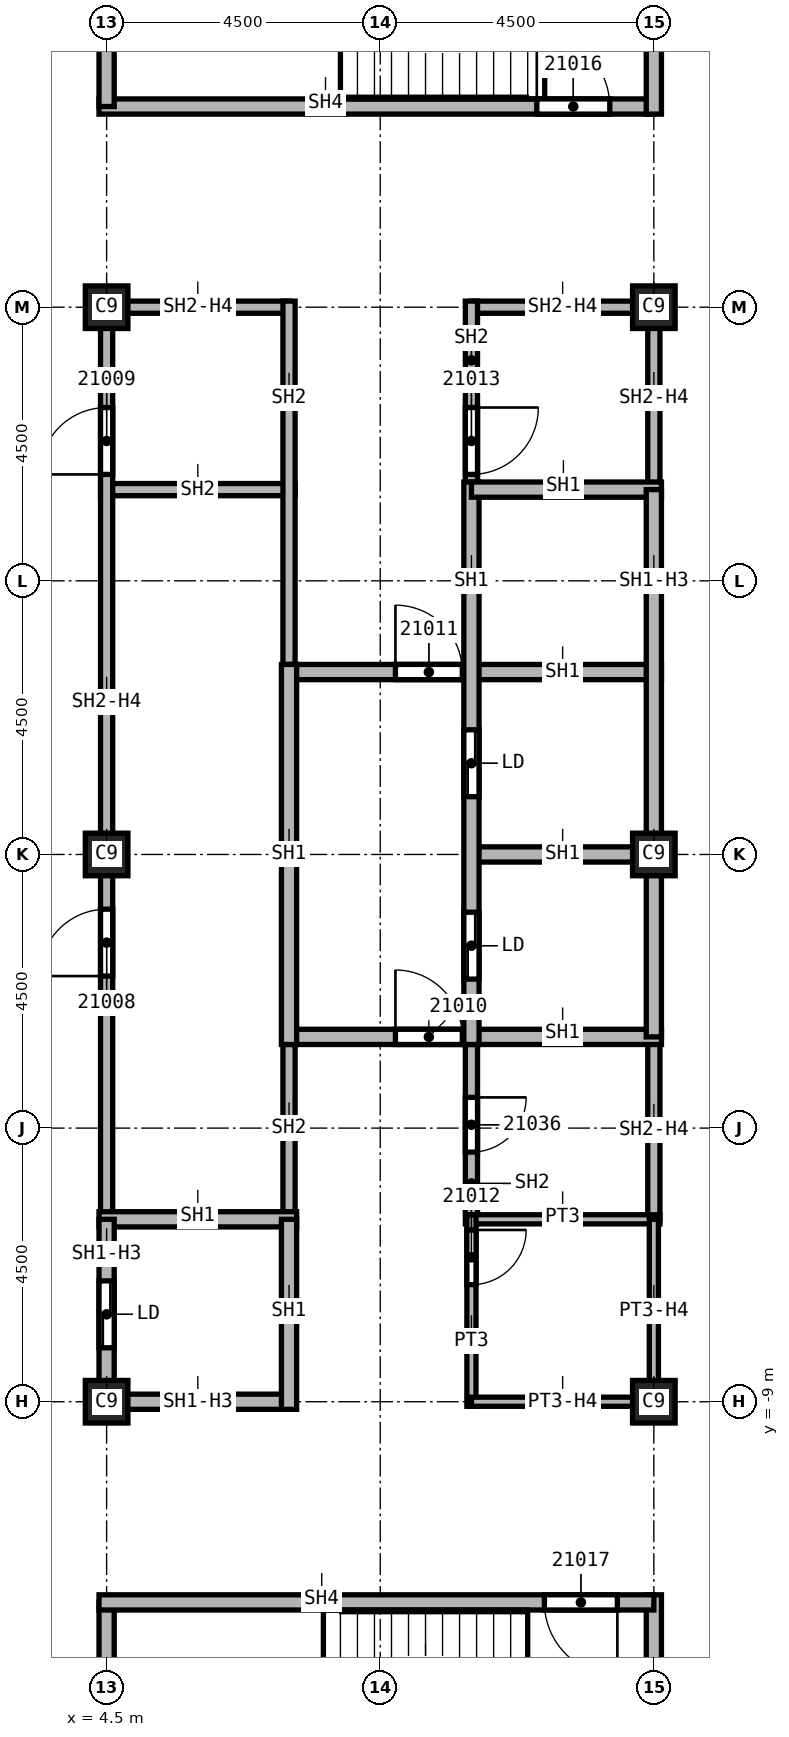
"""IFC4 building model, lengths in metres.
Left out: names, types, materials, properties, quantities, classifications, styles, units other than length and angle.
Written with IfcOpenShell. Run it as: python <this file> out.ifc"""

import sys

from ifc_helpers import new_model, si_unit, direction, frame, frame_2d, origin, origin_2d, place, context, subcontext, project, spatial, rectangle, extrude, element, fill, save


model = new_model("IFC4")
c1 = context("Model", 3, precision=1e-05, world=origin(), true_north=direction((0.0, 1.0)))
c2 = subcontext(c1, "Body", "Model", "MODEL_VIEW")
j1 = project(units=[si_unit("LENGTHUNIT", "METRE"), si_unit("PLANEANGLEUNIT", "RADIAN")], contexts=[c1])
p1 = place(None, origin())
s1 = spatial("IfcSite", under=j1, at=p1, CompositionType="ELEMENT")
p2 = place(p1, origin())
s2 = spatial("IfcBuilding", under=s1, at=p2, CompositionType="ELEMENT")
p3 = place(p2, frame((0.0, 0.0, 300.0)))
s3 = spatial("IfcBuildingStorey", under=s2, at=p3, CompositionType="ELEMENT", Elevation=300.0)
for number, where, z_axis, x_axis in (
    (1, (4.5, 0.0, 0.0), (0.0, 0.0, 1.0), (1.0, 0.0, 0.0)),
    (2, (4.5, 9.0, 0.0), (0.0, 0.0, 1.0), (1.0, 0.0, 0.0)),
    (3, (4.5, -9.0, 0.0), (0.0, 0.0, 1.0), (1.0, 0.0, 0.0)),
    (4, (13.5, 0.0, 0.0), (0.0, 0.0, 1.0), (1.0, 0.0, 0.0)),
    (5, (13.5, 9.0, 0.0), (0.0, 0.0, 1.0), (1.0, 0.0, 0.0)),
    (6, (13.5, -9.0, 0.0), (0.0, 0.0, 1.0), (1.0, 0.0, 0.0)),
):
    element("IfcColumn", number, at=place(p3, frame(where, z_axis=z_axis, x_axis=x_axis)), inside=s3, PredefinedType="COLUMN", context=c2, shape_type="SweptSolid", body=[
        extrude(rectangle(XDim=0.7, YDim=0.7, at=origin_2d()), origin(), (0.0, 0.0, 1.0), 3.74),
    ])
p4 = place(p3, frame((4.4, 6.0, 0.0), z_axis=(0.0, 0.0, 1.0), x_axis=(1.0, 0.0, 0.0)))
e7 = element("IfcWall", 7, at=p4, inside=s3, PredefinedType="SOLIDWALL", context=c2, shape_type="SweptSolid", body=[
    extrude(rectangle(XDim=3.2, YDim=0.2, at=frame_2d((1.6, 0.0))), origin(), (0.0, 0.0, 1.0), 3.74),
])
p5 = place(p3, frame((4.5, -6.0, 0.0), z_axis=(0.0, 0.0, 1.0), x_axis=(0.0, 1.0, 0.0)))
e8 = element("IfcWall", 8, at=p5, inside=s3, PredefinedType="SOLIDWALL", context=c2, shape_type="SweptSolid", body=[
    extrude(rectangle(XDim=15.1, YDim=0.2, at=frame_2d((7.55, 0.0))), origin(), (0.0, 0.0, 1.0), 3.062),
])
p6 = place(p5, frame((4.0, 0.0, 0.0)))
e9 = element("IfcOpeningElement", 9, at=p6, cuts=e8, PredefinedType="OPENING", context=c2, shape_type="SweptSolid", body=[
    extrude(rectangle(XDim=1.1, YDim=2.1, at=frame_2d((0.55, 1.05))), frame((0.0, 0.1, 0.0), z_axis=(0.0, -1.0, 0.0), x_axis=(1.0, 0.0, 0.0)), (0.0, 0.0, 1.0), 0.2),
])
p7 = place(p5, frame((12.25, 0.0, 0.0)))
e10 = element("IfcOpeningElement", 10, at=p7, cuts=e8, PredefinedType="OPENING", context=c2, shape_type="SweptSolid", body=[
    extrude(rectangle(XDim=1.1, YDim=2.1, at=frame_2d((0.55, 1.05))), frame((0.0, 0.1, 0.0), z_axis=(0.0, -1.0, 0.0), x_axis=(1.0, 0.0, 0.0)), (0.0, 0.0, 1.0), 0.2),
])
p8 = place(p3, frame((4.5, 9.0, 0.0), z_axis=(0.0, 0.0, 1.0), x_axis=(1.0, 0.0, 0.0)))
e11 = element("IfcWall", 11, at=p8, inside=s3, PredefinedType="SOLIDWALL", context=c2, shape_type="SweptSolid", body=[
    extrude(rectangle(XDim=3.0, YDim=0.2, at=frame_2d((1.5, 0.0))), origin(), (0.0, 0.0, 1.0), 3.062),
])
p9 = place(p3, frame((7.5, -2.875, 0.0), z_axis=(0.0, 0.0, 1.0), x_axis=(0.0, -1.0, 0.0)))
e12 = element("IfcWall", 12, at=p9, inside=s3, PredefinedType="SOLIDWALL", context=c2, shape_type="SweptSolid", body=[
    extrude(rectangle(XDim=3.125, YDim=0.2, at=frame_2d((1.562, 0.0))), origin(), (0.0, 0.0, 1.0), 3.74),
])
p10 = place(p3, frame((7.5, 9.1, 0.0), z_axis=(0.0, 0.0, 1.0), x_axis=(0.0, -1.0, 0.0)))
e13 = element("IfcWall", 13, at=p10, inside=s3, PredefinedType="SOLIDWALL", context=c2, shape_type="SweptSolid", body=[
    extrude(rectangle(XDim=6.225, YDim=0.2, at=frame_2d((3.113, 0.0))), origin(), (0.0, 0.0, 1.0), 3.74),
])
p11 = place(p3, frame((10.5, -2.875, 0.0), z_axis=(0.0, 0.0, 1.0), x_axis=(0.0, -1.0, 0.0)))
e14 = element("IfcWall", 14, at=p11, inside=s3, PredefinedType="SOLIDWALL", context=c2, shape_type="SweptSolid", body=[
    extrude(rectangle(XDim=3.2, YDim=0.2, at=frame_2d((1.6, 0.0))), origin(), (0.0, 0.0, 1.0), 3.74),
])
p12 = place(p11, frame((1.12, 0.0, 0.0)))
e15 = element("IfcOpeningElement", 15, at=p12, cuts=e14, PredefinedType="OPENING", context=c2, shape_type="SweptSolid", body=[
    extrude(rectangle(XDim=0.9, YDim=2.1, at=frame_2d((0.45, 1.05))), frame((0.0, 0.1, 0.0), z_axis=(0.0, -1.0, 0.0), x_axis=(1.0, 0.0, 0.0)), (0.0, 0.0, 1.0), 0.2),
])
p13 = place(p3, frame((10.5, 9.0, 0.0), z_axis=(0.0, 0.0, 1.0), x_axis=(1.0, 0.0, 0.0)))
e16 = element("IfcWall", 16, at=p13, inside=s3, PredefinedType="SOLIDWALL", context=c2, shape_type="SweptSolid", body=[
    extrude(rectangle(XDim=3.0, YDim=0.2, at=frame_2d((1.5, 0.0))), origin(), (0.0, 0.0, 1.0), 3.062),
])
p14 = place(p3, frame((10.5, 9.1, 0.0), z_axis=(0.0, 0.0, 1.0), x_axis=(0.0, -1.0, 0.0)))
e17 = element("IfcWall", 17, at=p14, inside=s3, PredefinedType="SOLIDWALL", context=c2, shape_type="SweptSolid", body=[
    extrude(rectangle(XDim=3.225, YDim=0.2, at=frame_2d((1.613, 0.0))), origin(), (0.0, 0.0, 1.0), 3.74),
])
p15 = place(p14, frame((1.75, 0.0, 0.0)))
e18 = element("IfcOpeningElement", 18, at=p15, cuts=e17, PredefinedType="OPENING", context=c2, shape_type="SweptSolid", body=[
    extrude(rectangle(XDim=1.1, YDim=2.1, at=frame_2d((0.55, 1.05))), frame((0.0, 0.1, 0.0), z_axis=(0.0, -1.0, 0.0), x_axis=(1.0, 0.0, 0.0)), (0.0, 0.0, 1.0), 0.2),
])
p16 = place(p3, frame((13.5, -3.0, 0.0), z_axis=(0.0, 0.0, 1.0), x_axis=(0.0, -1.0, 0.0)))
e19 = element("IfcWall", 19, at=p16, inside=s3, PredefinedType="SOLIDWALL", context=c2, shape_type="SweptSolid", body=[
    extrude(rectangle(XDim=3.0, YDim=0.2, at=frame_2d((1.5, 0.0))), origin(), (0.0, 0.0, 1.0), 3.062),
])
p17 = place(p3, frame((13.5, 9.1, 0.0), z_axis=(0.0, 0.0, 1.0), x_axis=(0.0, -1.0, 0.0)))
e20 = element("IfcWall", 20, at=p17, inside=s3, PredefinedType="SOLIDWALL", context=c2, shape_type="SweptSolid", body=[
    extrude(rectangle(XDim=3.1, YDim=0.2, at=frame_2d((1.55, 0.0))), origin(), (0.0, 0.0, 1.0), 3.062),
])
p18 = place(p3, frame((4.375, -6.0, 0.0), z_axis=(0.0, 0.0, 1.0), x_axis=(1.0, 0.0, 0.0)))
e21 = element("IfcWall", 21, at=p18, inside=s3, PredefinedType="SOLIDWALL", context=c2, shape_type="SweptSolid", body=[
    extrude(rectangle(XDim=3.25, YDim=0.25, at=frame_2d((1.625, 0.0))), origin(), (0.0, 0.0, 1.0), 3.74),
])
p19 = place(p3, frame((4.5, -9.125, 0.0), z_axis=(0.0, 0.0, 1.0), x_axis=(0.0, 1.0, 0.0)))
e22 = element("IfcWall", 22, at=p19, inside=s3, PredefinedType="SOLIDWALL", context=c2, shape_type="SweptSolid", body=[
    extrude(rectangle(XDim=3.125, YDim=0.25, at=frame_2d((1.562, 0.0))), origin(), (0.0, 0.0, 1.0), 3.062),
])
p20 = place(p19, frame((1.012, 0.0, 0.0)))
e23 = element("IfcOpeningElement", 23, at=p20, cuts=e22, PredefinedType="OPENING", context=c2, shape_type="SweptSolid", body=[
    extrude(rectangle(XDim=1.1, YDim=2.1, at=frame_2d((0.55, 1.05))), frame((0.0, 0.125, 0.0), z_axis=(0.0, -1.0, 0.0), x_axis=(1.0, 0.0, 0.0)), (0.0, 0.0, 1.0), 0.25),
])
p21 = place(p3, frame((7.5, -9.0, 0.0), z_axis=(0.0, 0.0, 1.0), x_axis=(-1.0, 0.0, 0.0)))
e24 = element("IfcWall", 24, at=p21, inside=s3, PredefinedType="SOLIDWALL", context=c2, shape_type="SweptSolid", body=[
    extrude(rectangle(XDim=3.0, YDim=0.25, at=frame_2d((1.5, 0.0))), origin(), (0.0, 0.0, 1.0), 3.062),
])
p22 = place(p3, frame((7.5, -6.0, 0.0), z_axis=(0.0, 0.0, 1.0), x_axis=(0.0, -1.0, 0.0)))
e25 = element("IfcWall", 25, at=p22, inside=s3, PredefinedType="SOLIDWALL", context=c2, shape_type="SweptSolid", body=[
    extrude(rectangle(XDim=3.125, YDim=0.25, at=frame_2d((1.562, 0.0))), origin(), (0.0, 0.0, 1.0), 3.74),
])
p23 = place(p3, frame((7.5, -3.0, 0.0), z_axis=(0.0, 0.0, 1.0), x_axis=(1.0, 0.0, 0.0)))
e26 = element("IfcWall", 26, at=p23, inside=s3, PredefinedType="SOLIDWALL", context=c2, shape_type="SweptSolid", body=[
    extrude(rectangle(XDim=6.125, YDim=0.25, at=frame_2d((3.062, 0.0))), origin(), (0.0, 0.0, 1.0), 3.74),
])
p24 = place(p23, frame((1.75, 0.0, 0.0)))
e27 = element("IfcOpeningElement", 27, at=p24, cuts=e26, PredefinedType="OPENING", context=c2, shape_type="SweptSolid", body=[
    extrude(rectangle(XDim=1.1, YDim=2.1, at=frame_2d((0.55, 1.05))), frame((0.0, 0.125, 0.0), z_axis=(0.0, -1.0, 0.0), x_axis=(1.0, 0.0, 0.0)), (0.0, 0.0, 1.0), 0.25),
])
p25 = place(p3, frame((7.5, 3.0, 0.0), z_axis=(0.0, 0.0, 1.0), x_axis=(1.0, 0.0, 0.0)))
e28 = element("IfcWall", 28, at=p25, inside=s3, PredefinedType="SOLIDWALL", context=c2, shape_type="SweptSolid", body=[
    extrude(rectangle(XDim=6.125, YDim=0.25, at=frame_2d((3.062, 0.0))), origin(), (0.0, 0.0, 1.0), 3.74),
])
p26 = place(p25, frame((1.75, 0.0, 0.0)))
e29 = element("IfcOpeningElement", 29, at=p26, cuts=e28, PredefinedType="OPENING", context=c2, shape_type="SweptSolid", body=[
    extrude(rectangle(XDim=1.1, YDim=2.1, at=frame_2d((0.55, 1.05))), frame((0.0, 0.125, 0.0), z_axis=(0.0, -1.0, 0.0), x_axis=(1.0, 0.0, 0.0)), (0.0, 0.0, 1.0), 0.25),
])
p27 = place(p3, frame((7.5, 3.125, 0.0), z_axis=(0.0, 0.0, 1.0), x_axis=(0.0, -1.0, 0.0)))
e30 = element("IfcWall", 30, at=p27, inside=s3, PredefinedType="SOLIDWALL", context=c2, shape_type="SweptSolid", body=[
    extrude(rectangle(XDim=6.25, YDim=0.25, at=frame_2d((3.125, 0.0))), origin(), (0.0, 0.0, 1.0), 3.74),
])
p28 = place(p3, frame((10.5, 0.0, 0.0), z_axis=(0.0, 0.0, 1.0), x_axis=(1.0, 0.0, 0.0)))
e31 = element("IfcWall", 31, at=p28, inside=s3, PredefinedType="SOLIDWALL", context=c2, shape_type="SweptSolid", body=[
    extrude(rectangle(XDim=3.125, YDim=0.25, at=frame_2d((1.562, 0.0))), origin(), (0.0, 0.0, 1.0), 3.74),
])
p29 = place(p3, frame((10.5, 6.125, 0.0), z_axis=(0.0, 0.0, 1.0), x_axis=(0.0, -1.0, 0.0)))
e32 = element("IfcWall", 32, at=p29, inside=s3, PredefinedType="SOLIDWALL", context=c2, shape_type="SweptSolid", body=[
    extrude(rectangle(XDim=9.25, YDim=0.25, at=frame_2d((4.625, 0.0))), origin(), (0.0, 0.0, 1.0), 3.74),
])
p30 = place(p29, frame((7.075, 0.0, 0.0)))
e33 = element("IfcOpeningElement", 33, at=p30, cuts=e32, PredefinedType="OPENING", context=c2, shape_type="SweptSolid", body=[
    extrude(rectangle(XDim=1.1, YDim=2.1, at=frame_2d((0.55, 1.05))), frame((0.0, 0.125, 0.0), z_axis=(0.0, -1.0, 0.0), x_axis=(1.0, 0.0, 0.0)), (0.0, 0.0, 1.0), 0.25),
])
p31 = place(p29, frame((4.075, 0.0, 0.0)))
e34 = element("IfcOpeningElement", 34, at=p31, cuts=e32, PredefinedType="OPENING", context=c2, shape_type="SweptSolid", body=[
    extrude(rectangle(XDim=1.1, YDim=2.1, at=frame_2d((0.55, 1.05))), frame((0.0, 0.125, 0.0), z_axis=(0.0, -1.0, 0.0), x_axis=(1.0, 0.0, 0.0)), (0.0, 0.0, 1.0), 0.25),
])
p32 = place(p3, frame((10.5, 6.0, 0.0), z_axis=(0.0, 0.0, 1.0), x_axis=(1.0, 0.0, 0.0)))
e35 = element("IfcWall", 35, at=p32, inside=s3, PredefinedType="SOLIDWALL", context=c2, shape_type="SweptSolid", body=[
    extrude(rectangle(XDim=3.125, YDim=0.25, at=frame_2d((1.562, 0.0))), origin(), (0.0, 0.0, 1.0), 3.74),
])
p33 = place(p3, frame((13.5, 6.0, 0.0), z_axis=(0.0, 0.0, 1.0), x_axis=(0.0, -1.0, 0.0)))
e36 = element("IfcWall", 36, at=p33, inside=s3, PredefinedType="SOLIDWALL", context=c2, shape_type="SweptSolid", body=[
    extrude(rectangle(XDim=9.0, YDim=0.25, at=frame_2d((4.5, 0.0))), origin(), (0.0, 0.0, 1.0), 3.062),
])
p34 = place(p3, frame((4.375, 12.3, 0.0), z_axis=(0.0, 0.0, 1.0), x_axis=(1.0, 0.0, 0.0)))
e37 = element("IfcWall", 37, at=p34, inside=s3, PredefinedType="SOLIDWALL", context=c2, shape_type="SweptSolid", body=[
    extrude(rectangle(XDim=9.125, YDim=0.25, at=frame_2d((4.562, 0.0))), origin(), (0.0, 0.0, 1.0), 3.74),
])
p35 = place(p34, frame((7.2, 0.0, 0.0)))
e38 = element("IfcOpeningElement", 38, at=p35, cuts=e37, PredefinedType="OPENING", context=c2, shape_type="SweptSolid", body=[
    extrude(rectangle(XDim=1.2, YDim=2.1, at=frame_2d((0.6, 1.05))), frame((0.0, 0.125, 0.0), z_axis=(0.0, -1.0, 0.0), x_axis=(1.0, 0.0, 0.0)), (0.0, 0.0, 1.0), 0.25),
])
for number, where, z_axis, x_axis in (
    (39, (4.5, -16.8, 0.0), (0.0, 0.0, 1.0), (0.0, 1.0, 0.0)),
    (40, (4.5, 12.3, 0.0), (0.0, 0.0, 1.0), (0.0, 1.0, 0.0)),
):
    element("IfcWall", number, at=place(p3, frame(where, z_axis=z_axis, x_axis=x_axis)), inside=s3, PredefinedType="SOLIDWALL", context=c2, shape_type="SweptSolid", body=[
        extrude(rectangle(XDim=4.5, YDim=0.25, at=frame_2d((2.25, 0.0))), origin(), (0.0, 0.0, 1.0), 3.74),
    ])
p36 = place(p3, frame((13.5, -16.925, 0.0), z_axis=(0.0, 0.0, 1.0), x_axis=(0.0, 1.0, 0.0)))
e41 = element("IfcWall", 41, at=p36, inside=s3, PredefinedType="SOLIDWALL", context=c2, shape_type="SweptSolid", body=[
    extrude(rectangle(XDim=4.75, YDim=0.25, at=frame_2d((2.375, 0.0))), origin(), (0.0, 0.0, 1.0), 3.74),
])
p37 = place(p3, frame((13.5, -12.3, 0.0), z_axis=(0.0, 0.0, 1.0), x_axis=(-1.0, 0.0, 0.0)))
e42 = element("IfcWall", 42, at=p37, inside=s3, PredefinedType="SOLIDWALL", context=c2, shape_type="SweptSolid", body=[
    extrude(rectangle(XDim=9.125, YDim=0.25, at=frame_2d((4.562, 0.0))), origin(), (0.0, 0.0, 1.0), 3.74),
])
p38 = place(p37, frame((0.6, 0.0, 0.0)))
e43 = element("IfcOpeningElement", 43, at=p38, cuts=e42, PredefinedType="OPENING", context=c2, shape_type="SweptSolid", body=[
    extrude(rectangle(XDim=1.2, YDim=2.1, at=frame_2d((0.6, 1.05))), frame((0.0, 0.125, 0.0), z_axis=(0.0, -1.0, 0.0), x_axis=(1.0, 0.0, 0.0)), (0.0, 0.0, 1.0), 0.25),
])
p39 = place(p3, frame((13.5, 12.175, 0.0), z_axis=(0.0, 0.0, 1.0), x_axis=(0.0, 1.0, 0.0)))
e44 = element("IfcWall", 44, at=p39, inside=s3, PredefinedType="SOLIDWALL", context=c2, shape_type="SweptSolid", body=[
    extrude(rectangle(XDim=4.75, YDim=0.25, at=frame_2d((2.375, 0.0))), origin(), (0.0, 0.0, 1.0), 3.74),
])
p40 = place(p3, frame((10.5, -6.0, 0.0), z_axis=(0.0, 0.0, 1.0), x_axis=(1.0, 0.0, 0.0)))
e45 = element("IfcWall", 45, at=p40, inside=s3, PredefinedType="PARTITIONING", context=c2, shape_type="SweptSolid", body=[
    extrude(rectangle(XDim=3.1, YDim=0.15, at=frame_2d((1.55, 0.0))), origin(), (0.0, 0.0, 1.0), 3.74),
])
p41 = place(p3, frame((10.5, -5.925, 0.0), z_axis=(0.0, 0.0, 1.0), x_axis=(0.0, -1.0, 0.0)))
e46 = element("IfcWall", 46, at=p41, inside=s3, PredefinedType="PARTITIONING", context=c2, shape_type="SweptSolid", body=[
    extrude(rectangle(XDim=3.15, YDim=0.15, at=frame_2d((1.575, 0.0))), origin(), (0.0, 0.0, 1.0), 3.74),
])
p42 = place(p41, frame((0.25, 0.0, 0.0)))
e47 = element("IfcOpeningElement", 47, at=p42, cuts=e46, PredefinedType="OPENING", context=c2, shape_type="SweptSolid", body=[
    extrude(rectangle(XDim=0.9, YDim=2.1, at=frame_2d((0.45, 1.05))), frame((0.0, 0.075, 0.0), z_axis=(0.0, -1.0, 0.0), x_axis=(1.0, 0.0, 0.0)), (0.0, 0.0, 1.0), 0.15),
])
p43 = place(p3, frame((13.5, -9.0, 0.0), z_axis=(0.0, 0.0, 1.0), x_axis=(-1.0, 0.0, 0.0)))
e48 = element("IfcWall", 48, at=p43, inside=s3, PredefinedType="PARTITIONING", context=c2, shape_type="SweptSolid", body=[
    extrude(rectangle(XDim=3.0, YDim=0.15, at=frame_2d((1.5, 0.0))), origin(), (0.0, 0.0, 1.0), 3.062),
])
p44 = place(p3, frame((13.5, -6.0, 0.0), z_axis=(0.0, 0.0, 1.0), x_axis=(0.0, -1.0, 0.0)))
e49 = element("IfcWall", 49, at=p44, inside=s3, PredefinedType="PARTITIONING", context=c2, shape_type="SweptSolid", body=[
    extrude(rectangle(XDim=3.075, YDim=0.15, at=frame_2d((1.538, 0.0))), origin(), (0.0, 0.0, 1.0), 3.062),
])
p45 = place(p6, origin())
e50 = element("IfcDoor", 50, at=p45, inside=s3, OperationType="SINGLE_SWING_LEFT", PredefinedType="DOOR", context=c2, shape_type="SweptSolid", body=[
    extrude(rectangle(XDim=1.1, YDim=2.1, at=frame_2d((0.55, 1.05))), frame((0.0, 0.025, 0.0), z_axis=(0.0, -1.0, 0.0), x_axis=(1.0, 0.0, 0.0)), (0.0, 0.0, 1.0), 0.05),
])
fill(e9, e50)
p46 = place(p7, origin())
e51 = element("IfcDoor", 51, at=p46, inside=s3, OperationType="SINGLE_SWING_RIGHT", PredefinedType="DOOR", context=c2, shape_type="SweptSolid", body=[
    extrude(rectangle(XDim=1.1, YDim=2.1, at=frame_2d((0.55, 1.05))), frame((0.0, 0.025, 0.0), z_axis=(0.0, -1.0, 0.0), x_axis=(1.0, 0.0, 0.0)), (0.0, 0.0, 1.0), 0.05),
])
fill(e10, e51)
p47 = place(p24, origin())
e52 = element("IfcDoor", 52, at=p47, inside=s3, OperationType="SINGLE_SWING_LEFT", PredefinedType="DOOR", context=c2, shape_type="SweptSolid", body=[
    extrude(rectangle(XDim=1.1, YDim=2.1, at=frame_2d((0.55, 1.05))), frame((0.0, 0.025, 0.0), z_axis=(0.0, -1.0, 0.0), x_axis=(1.0, 0.0, 0.0)), (0.0, 0.0, 1.0), 0.05),
])
fill(e27, e52)
p48 = place(p26, origin())
e53 = element("IfcDoor", 53, at=p48, inside=s3, OperationType="SINGLE_SWING_RIGHT", PredefinedType="DOOR", context=c2, shape_type="SweptSolid", body=[
    extrude(rectangle(XDim=1.1, YDim=2.1, at=frame_2d((0.55, 1.05))), frame((0.0, 0.025, 0.0), z_axis=(0.0, -1.0, 0.0), x_axis=(1.0, 0.0, 0.0)), (0.0, 0.0, 1.0), 0.05),
])
fill(e29, e53)
p49 = place(p42, origin())
e54 = element("IfcDoor", 54, at=p49, inside=s3, OperationType="SINGLE_SWING_LEFT", PredefinedType="DOOR", context=c2, shape_type="SweptSolid", body=[
    extrude(rectangle(XDim=0.9, YDim=2.1, at=frame_2d((0.45, 1.05))), frame((0.0, 0.025, 0.0), z_axis=(0.0, -1.0, 0.0), x_axis=(1.0, 0.0, 0.0)), (0.0, 0.0, 1.0), 0.05),
])
fill(e47, e54)
p50 = place(p15, origin())
e55 = element("IfcDoor", 55, at=p50, inside=s3, OperationType="SINGLE_SWING_RIGHT", PredefinedType="DOOR", context=c2, shape_type="SweptSolid", body=[
    extrude(rectangle(XDim=1.1, YDim=2.1, at=frame_2d((0.55, 1.05))), frame((0.0, 0.025, 0.0), z_axis=(0.0, -1.0, 0.0), x_axis=(1.0, 0.0, 0.0)), (0.0, 0.0, 1.0), 0.05),
])
fill(e18, e55)
p51 = place(p35, origin())
e56 = element("IfcDoor", 56, at=p51, inside=s3, OperationType="SINGLE_SWING_LEFT", PredefinedType="DOOR", context=c2, shape_type="SweptSolid", body=[
    extrude(rectangle(XDim=1.2, YDim=2.1, at=frame_2d((0.6, 1.05))), frame((0.0, 0.025, 0.0), z_axis=(0.0, -1.0, 0.0), x_axis=(1.0, 0.0, 0.0)), (0.0, 0.0, 1.0), 0.05),
])
fill(e38, e56)
p52 = place(p38, origin())
e57 = element("IfcDoor", 57, at=p52, inside=s3, OperationType="SINGLE_SWING_RIGHT", PredefinedType="DOOR", context=c2, shape_type="SweptSolid", body=[
    extrude(rectangle(XDim=1.2, YDim=2.1, at=frame_2d((0.6, 1.05))), frame((0.0, 0.025, 0.0), z_axis=(0.0, -1.0, 0.0), x_axis=(1.0, 0.0, 0.0)), (0.0, 0.0, 1.0), 0.05),
])
fill(e43, e57)
p53 = place(p12, origin())
e58 = element("IfcDoor", 58, at=p53, inside=s3, OperationType="SINGLE_SWING_LEFT", PredefinedType="DOOR", context=c2, shape_type="SweptSolid", body=[
    extrude(rectangle(XDim=0.9, YDim=2.1, at=frame_2d((0.45, 1.05))), frame((0.0, 0.025, 0.0), z_axis=(0.0, -1.0, 0.0), x_axis=(1.0, 0.0, 0.0)), (0.0, 0.0, 1.0), 0.05),
])
fill(e15, e58)
p54 = place(p20, origin())
e59 = element("IfcDoor", 59, at=p54, inside=s3, OperationType="SLIDING_TO_LEFT", PredefinedType="DOOR", context=c2, shape_type="SweptSolid", body=[
    extrude(rectangle(XDim=1.1, YDim=2.1, at=frame_2d((0.55, 1.05))), frame((0.0, 0.025, 0.0), z_axis=(0.0, -1.0, 0.0), x_axis=(1.0, 0.0, 0.0)), (0.0, 0.0, 1.0), 0.05),
])
fill(e23, e59)
p55 = place(p30, origin())
e60 = element("IfcDoor", 60, at=p55, inside=s3, OperationType="SLIDING_TO_LEFT", PredefinedType="DOOR", context=c2, shape_type="SweptSolid", body=[
    extrude(rectangle(XDim=1.1, YDim=2.1, at=frame_2d((0.55, 1.05))), frame((0.0, 0.025, 0.0), z_axis=(0.0, -1.0, 0.0), x_axis=(1.0, 0.0, 0.0)), (0.0, 0.0, 1.0), 0.05),
])
fill(e33, e60)
p56 = place(p31, origin())
e61 = element("IfcDoor", 61, at=p56, inside=s3, OperationType="SLIDING_TO_LEFT", PredefinedType="DOOR", context=c2, shape_type="SweptSolid", body=[
    extrude(rectangle(XDim=1.1, YDim=2.1, at=frame_2d((0.55, 1.05))), frame((0.0, 0.025, 0.0), z_axis=(0.0, -1.0, 0.0), x_axis=(1.0, 0.0, 0.0)), (0.0, 0.0, 1.0), 0.05),
])
fill(e34, e61)
save(model, sys.argv[1])
